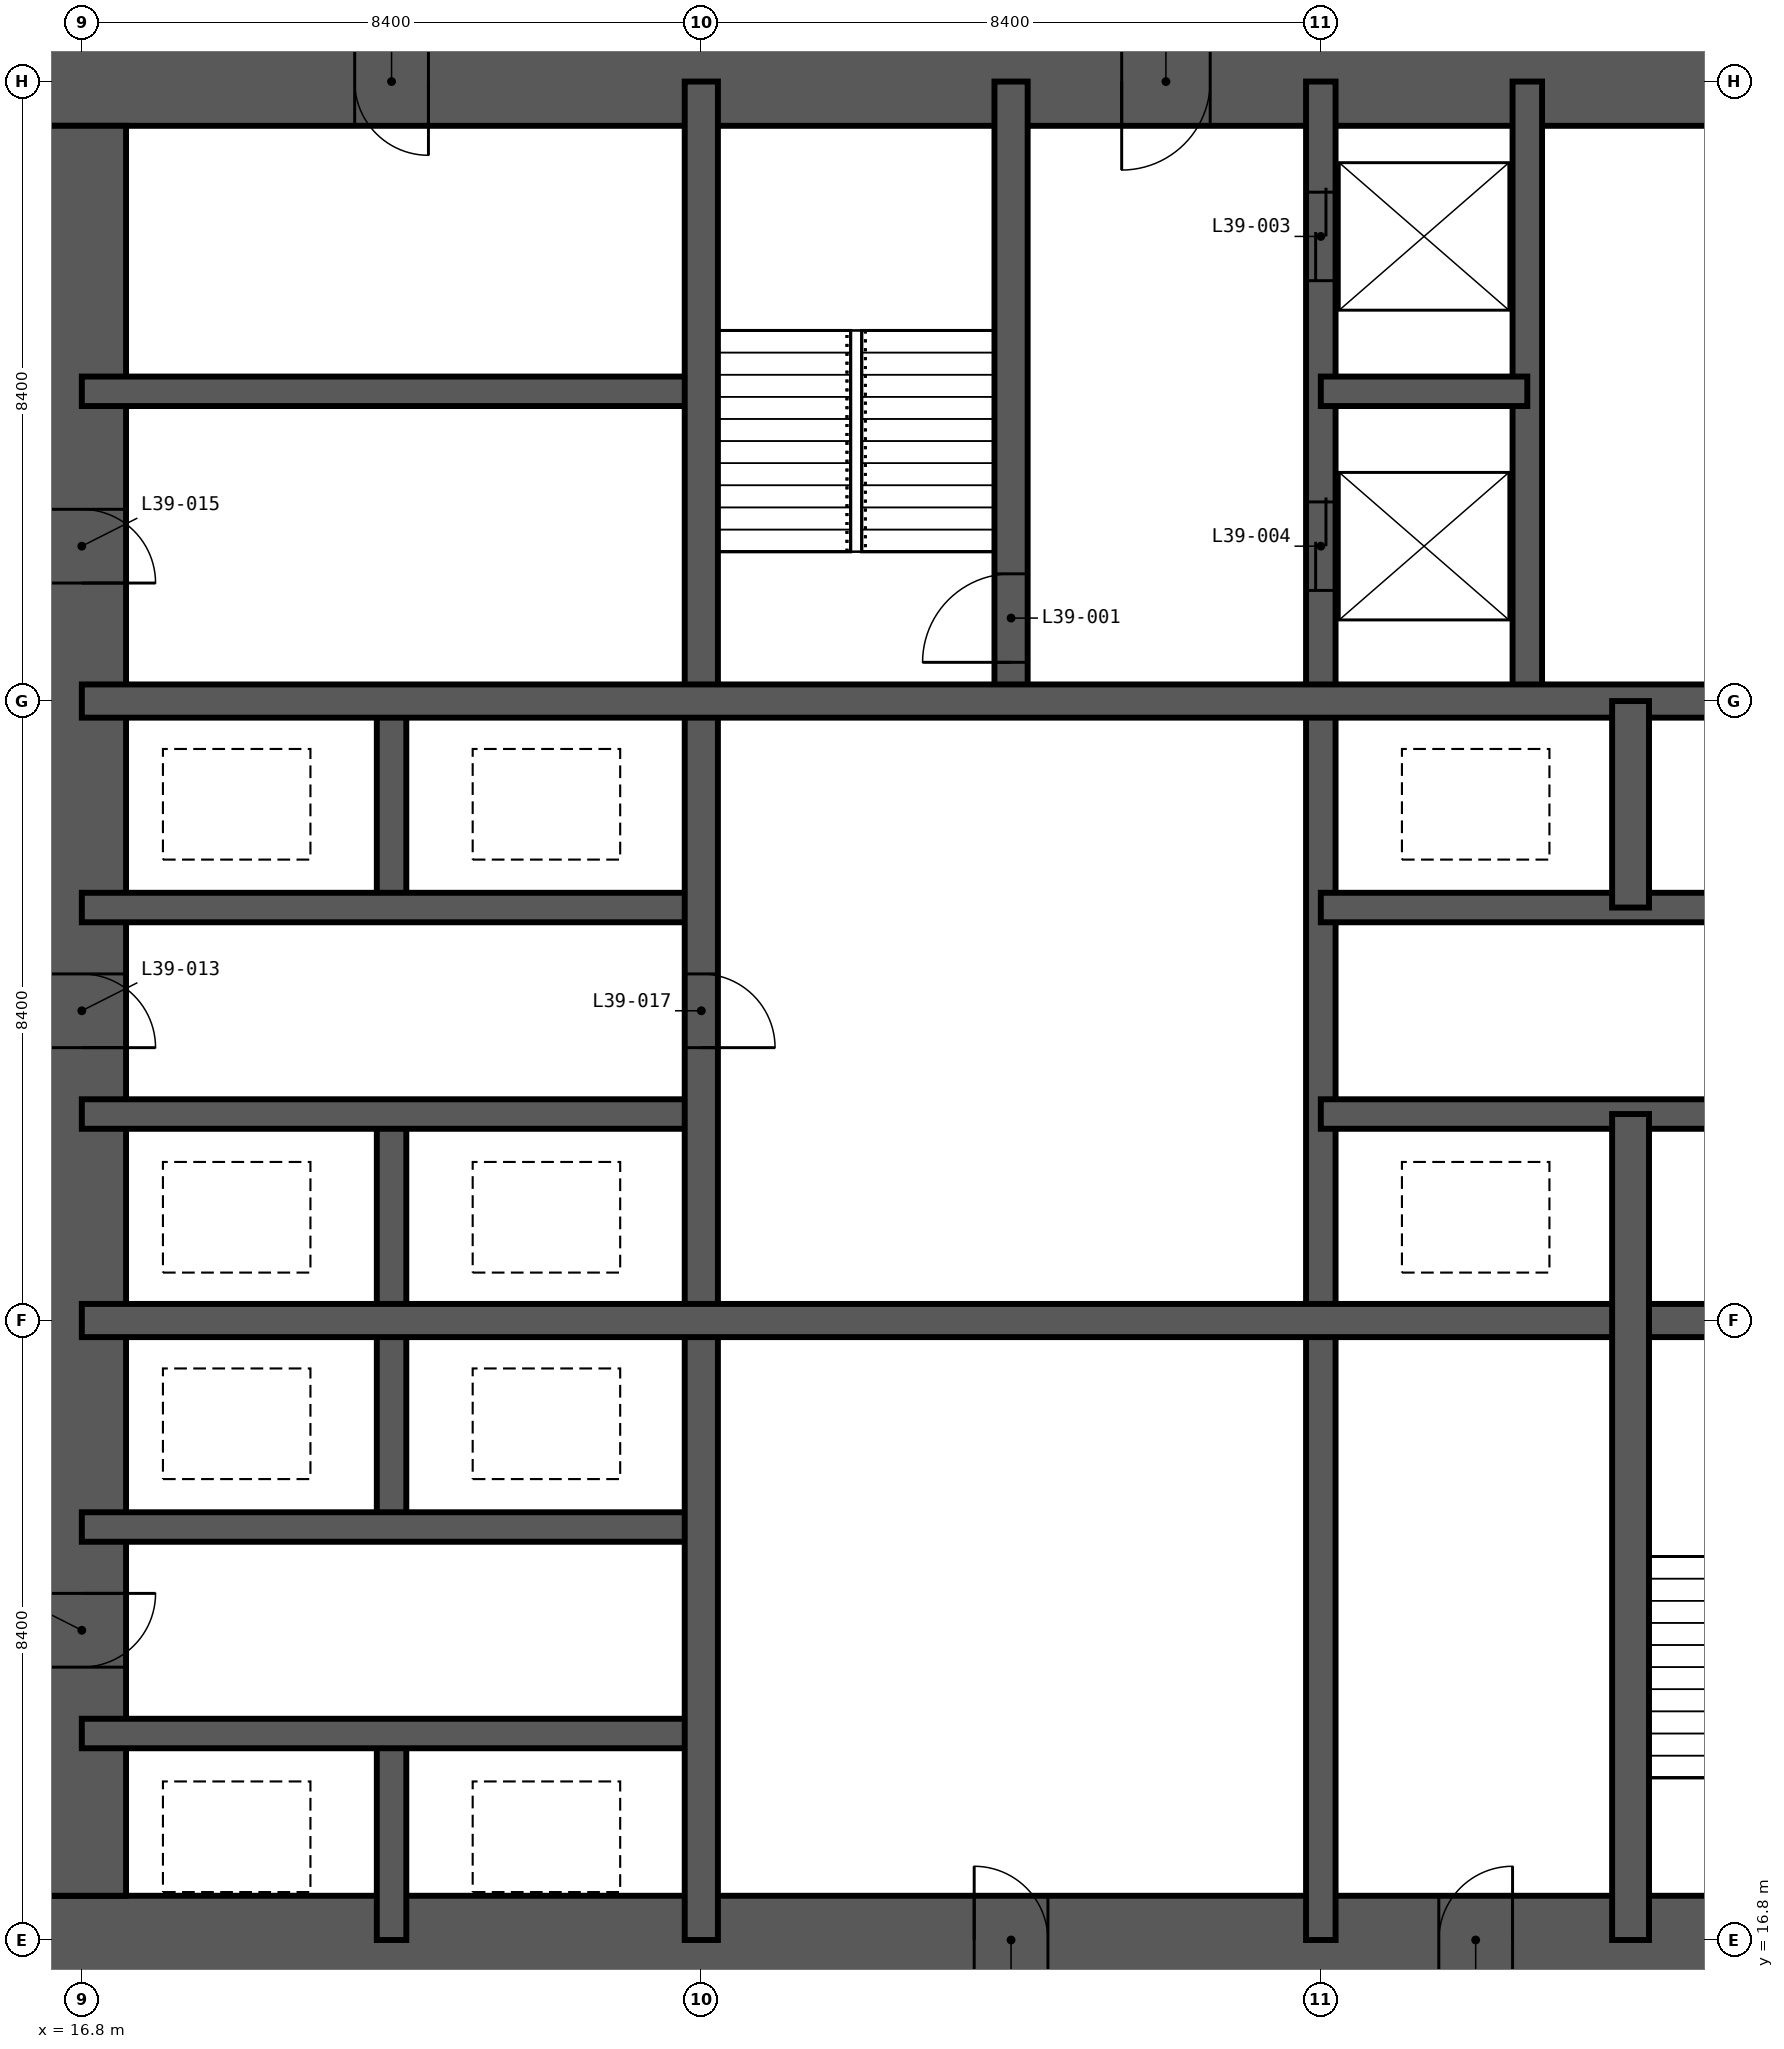
"""IFC4 building model, lengths in metres.
Left out: names, types, materials, properties, quantities, classifications, styles, units other than length and angle.
Written with IfcOpenShell. Run it as: python <this file> out.ifc"""

import sys

from ifc_helpers import new_model, si_unit, direction, frame, frame_2d, origin, place, context, subcontext, project, spatial, rectangle, extrude, element, fill, save


model = new_model("IFC4")
c1 = context("Model", 3, precision=1e-05, world=origin(), true_north=direction((0.0, 1.0)))
c2 = subcontext(c1, "Body", "Model", "MODEL_VIEW")
j1 = project(units=[si_unit("LENGTHUNIT", "METRE"), si_unit("PLANEANGLEUNIT", "RADIAN")], contexts=[c1])
p1 = place(None, origin())
s1 = spatial("IfcSite", under=j1, at=p1, CompositionType="ELEMENT")
p2 = place(p1, origin())
s2 = spatial("IfcBuilding", under=s1, at=p2, CompositionType="ELEMENT")
p3 = place(p2, frame((0.0, 0.0, 153.6)))
s3 = spatial("IfcBuildingStorey", under=s2, at=p3, CompositionType="ELEMENT", Elevation=153.6)
p4 = place(p3, frame((16.2, 16.8, -0.4), z_axis=(0.0, 0.0, 1.0), x_axis=(1.0, 0.0, 0.0)))
e1 = element("IfcWall", 1, at=p4, inside=s3, PredefinedType="SHEAR", context=c2, shape_type="SweptSolid", body=[
    extrude(rectangle(XDim=26.4, YDim=1.2, at=frame_2d((13.2, 0.0))), origin(), (0.0, 0.0, 1.0), 5.45),
])
p5 = place(p4, frame((12.7, 0.0, 0.4)))
e2 = element("IfcOpeningElement", 2, at=p5, cuts=e1, PredefinedType="OPENING", context=c2, shape_type="SweptSolid", body=[
    extrude(rectangle(XDim=1.0, YDim=2.1, at=frame_2d((0.5, 1.05))), frame((0.0, 0.61, 0.0), z_axis=(0.0, -1.0, 0.0), x_axis=(1.0, 0.0, 0.0)), (0.0, 0.0, 1.0), 1.22),
])
p6 = place(p4, frame((19.0, 0.0, 0.4)))
e3 = element("IfcOpeningElement", 3, at=p6, cuts=e1, PredefinedType="OPENING", context=c2, shape_type="SweptSolid", body=[
    extrude(rectangle(XDim=1.0, YDim=2.1, at=frame_2d((0.5, 1.05))), frame((0.0, 0.61, 0.0), z_axis=(0.0, -1.0, 0.0), x_axis=(1.0, 0.0, 0.0)), (0.0, 0.0, 1.0), 1.22),
])
p7 = place(p3, frame((42.6, 42.0, -0.4), z_axis=(0.0, 0.0, 1.0), x_axis=(-1.0, 0.0, 0.0)))
e4 = element("IfcWall", 4, at=p7, inside=s3, PredefinedType="SHEAR", context=c2, shape_type="SweptSolid", body=[
    extrude(rectangle(XDim=26.4, YDim=1.2, at=frame_2d((13.2, 0.0))), origin(), (0.0, 0.0, 1.0), 5.45),
])
p8 = place(p7, frame((21.1, 0.0, 0.4)))
e5 = element("IfcOpeningElement", 5, at=p8, cuts=e4, PredefinedType="OPENING", context=c2, shape_type="SweptSolid", body=[
    extrude(rectangle(XDim=1.0, YDim=2.1, at=frame_2d((0.5, 1.05))), frame((0.0, 0.61, 0.0), z_axis=(0.0, -1.0, 0.0), x_axis=(1.0, 0.0, 0.0)), (0.0, 0.0, 1.0), 1.22),
])
p9 = place(p7, frame((10.5, 0.0, 0.4)))
e6 = element("IfcOpeningElement", 6, at=p9, cuts=e4, PredefinedType="OPENING", context=c2, shape_type="SweptSolid", body=[
    extrude(rectangle(XDim=1.2, YDim=2.2, at=frame_2d((0.6, 1.1))), frame((0.0, 0.61, 0.0), z_axis=(0.0, -1.0, 0.0), x_axis=(1.0, 0.0, 0.0)), (0.0, 0.0, 1.0), 1.22),
])
p10 = place(p3, frame((16.8, 41.4, -0.4), z_axis=(0.0, 0.0, 1.0), x_axis=(0.0, -1.0, 0.0)))
e7 = element("IfcWall", 7, at=p10, inside=s3, PredefinedType="SHEAR", context=c2, shape_type="SweptSolid", body=[
    extrude(rectangle(XDim=24.0, YDim=1.2, at=frame_2d((12.0, 0.0))), origin(), (0.0, 0.0, 1.0), 5.45),
])
p11 = place(p10, frame((11.5, 0.0, 0.4)))
e8 = element("IfcOpeningElement", 8, at=p11, cuts=e7, PredefinedType="OPENING", context=c2, shape_type="SweptSolid", body=[
    extrude(rectangle(XDim=1.0, YDim=2.1, at=frame_2d((0.5, 1.05))), frame((0.0, 0.61, 0.0), z_axis=(0.0, -1.0, 0.0), x_axis=(1.0, 0.0, 0.0)), (0.0, 0.0, 1.0), 1.22),
])
p12 = place(p10, frame((19.9, 0.0, 0.4)))
e9 = element("IfcOpeningElement", 9, at=p12, cuts=e7, PredefinedType="OPENING", context=c2, shape_type="SweptSolid", body=[
    extrude(rectangle(XDim=1.0, YDim=2.1, at=frame_2d((0.5, 1.05))), frame((0.0, 0.61, 0.0), z_axis=(0.0, -1.0, 0.0), x_axis=(1.0, 0.0, 0.0)), (0.0, 0.0, 1.0), 1.22),
])
p13 = place(p10, frame((5.2, 0.0, 0.4)))
e10 = element("IfcOpeningElement", 10, at=p13, cuts=e7, PredefinedType="OPENING", context=c2, shape_type="SweptSolid", body=[
    extrude(rectangle(XDim=1.0, YDim=2.1, at=frame_2d((0.5, 1.05))), frame((0.0, 0.61, 0.0), z_axis=(0.0, -1.0, 0.0), x_axis=(1.0, 0.0, 0.0)), (0.0, 0.0, 1.0), 1.22),
])
p14 = place(p3, frame((21.0, 16.8, -0.4), z_axis=(0.0, 0.0, 1.0), x_axis=(0.0, 1.0, 0.0)))
e11 = element("IfcWall", 11, at=p14, inside=s3, PredefinedType="SHEAR", context=c2, shape_type="SweptSolid", body=[
    extrude(rectangle(XDim=2.8, YDim=0.4, at=frame_2d((1.4, 0.0))), origin(), (0.0, 0.0, 1.0), 5.45),
])
p15 = place(p3, frame((21.0, 22.4, -0.4), z_axis=(0.0, 0.0, 1.0), x_axis=(0.0, 1.0, 0.0)))
e12 = element("IfcWall", 12, at=p15, inside=s3, PredefinedType="SHEAR", context=c2, shape_type="SweptSolid", body=[
    extrude(rectangle(XDim=5.6, YDim=0.4, at=frame_2d((2.8, 0.0))), origin(), (0.0, 0.0, 1.0), 5.45),
])
p16 = place(p3, frame((21.0, 30.8, -0.4), z_axis=(0.0, 0.0, 1.0), x_axis=(0.0, 1.0, 0.0)))
e13 = element("IfcWall", 13, at=p16, inside=s3, PredefinedType="SHEAR", context=c2, shape_type="SweptSolid", body=[
    extrude(rectangle(XDim=2.8, YDim=0.4, at=frame_2d((1.4, 0.0))), origin(), (0.0, 0.0, 1.0), 5.45),
])
p17 = place(p3, frame((33.6, 16.8, -0.4), z_axis=(0.0, 0.0, 1.0), x_axis=(0.0, 1.0, 0.0)))
e14 = element("IfcWall", 14, at=p17, inside=s3, PredefinedType="SHEAR", context=c2, shape_type="SweptSolid", body=[
    extrude(rectangle(XDim=25.2, YDim=0.4, at=frame_2d((12.6, 0.0))), origin(), (0.0, 0.0, 1.0), 5.45),
])
p18 = place(p17, frame((22.5, 0.0, 0.4)))
e15 = element("IfcOpeningElement", 15, at=p18, cuts=e14, PredefinedType="OPENING", context=c2, shape_type="SweptSolid", body=[
    extrude(rectangle(XDim=1.2, YDim=2.2, at=frame_2d((0.6, 1.1))), frame((0.0, 0.21, 0.0), z_axis=(0.0, -1.0, 0.0), x_axis=(1.0, 0.0, 0.0)), (0.0, 0.0, 1.0), 0.42),
])
p19 = place(p17, frame((18.3, 0.0, 0.4)))
e16 = element("IfcOpeningElement", 16, at=p19, cuts=e14, PredefinedType="OPENING", context=c2, shape_type="SweptSolid", body=[
    extrude(rectangle(XDim=1.2, YDim=2.2, at=frame_2d((0.6, 1.1))), frame((0.0, 0.21, 0.0), z_axis=(0.0, -1.0, 0.0), x_axis=(1.0, 0.0, 0.0)), (0.0, 0.0, 1.0), 0.42),
])
for number, where, z_axis, x_axis in (
    (17, (36.4, 33.6, -0.4), (0.0, 0.0, 1.0), (0.0, 1.0, 0.0)),
    (18, (16.8, 19.6, -0.4), (0.0, 0.0, 1.0), (1.0, 0.0, 0.0)),
    (19, (16.8, 22.4, -0.4), (0.0, 0.0, 1.0), (1.0, 0.0, 0.0)),
    (20, (16.8, 28.0, -0.4), (0.0, 0.0, 1.0), (1.0, 0.0, 0.0)),
    (21, (33.6, 28.0, -0.4), (0.0, 0.0, 1.0), (1.0, 0.0, 0.0)),
    (22, (16.8, 30.8, -0.4), (0.0, 0.0, 1.0), (1.0, 0.0, 0.0)),
    (23, (33.6, 30.8, -0.4), (0.0, 0.0, 1.0), (1.0, 0.0, 0.0)),
    (24, (16.8, 37.8, -0.4), (0.0, 0.0, 1.0), (1.0, 0.0, 0.0)),
):
    element("IfcWall", number, at=place(p3, frame(where, z_axis=z_axis, x_axis=x_axis)), inside=s3, PredefinedType="SHEAR", context=c2, shape_type="SweptSolid", body=[
        extrude(rectangle(XDim=8.4, YDim=0.4, at=frame_2d((4.2, 0.0))), origin(), (0.0, 0.0, 1.0), 5.45),
    ])
p20 = place(p3, frame((33.6, 37.8, -0.4), z_axis=(0.0, 0.0, 1.0), x_axis=(1.0, 0.0, 0.0)))
e25 = element("IfcWall", 25, at=p20, inside=s3, PredefinedType="SHEAR", context=c2, shape_type="SweptSolid", body=[
    extrude(rectangle(XDim=2.8, YDim=0.4, at=frame_2d((1.4, 0.0))), origin(), (0.0, 0.0, 1.0), 5.45),
])
p21 = place(p3, frame((25.2, 16.8, -0.4), z_axis=(0.0, 0.0, 1.0), x_axis=(0.0, 1.0, 0.0)))
e26 = element("IfcWall", 26, at=p21, inside=s3, PredefinedType="SHEAR", context=c2, shape_type="SweptSolid", body=[
    extrude(rectangle(XDim=25.2, YDim=0.45, at=frame_2d((12.6, 0.0))), origin(), (0.0, 0.0, 1.0), 5.45),
])
p22 = place(p21, frame((12.1, 0.0, 0.4)))
e27 = element("IfcOpeningElement", 27, at=p22, cuts=e26, PredefinedType="OPENING", context=c2, shape_type="SweptSolid", body=[
    extrude(rectangle(XDim=1.0, YDim=2.1, at=frame_2d((0.5, 1.05))), frame((0.0, 0.235, 0.0), z_axis=(0.0, -1.0, 0.0), x_axis=(1.0, 0.0, 0.0)), (0.0, 0.0, 1.0), 0.47),
])
p23 = place(p3, frame((29.4, 33.6, -0.4), z_axis=(0.0, 0.0, 1.0), x_axis=(0.0, 1.0, 0.0)))
e28 = element("IfcWall", 28, at=p23, inside=s3, PredefinedType="SHEAR", context=c2, shape_type="SweptSolid", body=[
    extrude(rectangle(XDim=8.4, YDim=0.45, at=frame_2d((4.2, 0.0))), origin(), (0.0, 0.0, 1.0), 5.45),
])
p24 = place(p23, frame((0.525, 0.0, 0.4)))
e29 = element("IfcOpeningElement", 29, at=p24, cuts=e28, PredefinedType="OPENING", context=c2, shape_type="SweptSolid", body=[
    extrude(rectangle(XDim=1.2, YDim=2.2, at=frame_2d((0.6, 1.1))), frame((0.0, 0.235, 0.0), z_axis=(0.0, -1.0, 0.0), x_axis=(1.0, 0.0, 0.0)), (0.0, 0.0, 1.0), 0.47),
])
for number, where, z_axis, x_axis in (
    (30, (16.8, 25.2, -0.4), (0.0, 0.0, 1.0), (1.0, 0.0, 0.0)),
    (31, (16.8, 33.6, -0.4), (0.0, 0.0, 1.0), (1.0, 0.0, 0.0)),
):
    element("IfcWall", number, at=place(p3, frame(where, z_axis=z_axis, x_axis=x_axis)), inside=s3, PredefinedType="SHEAR", context=c2, shape_type="SweptSolid", body=[
        extrude(rectangle(XDim=25.2, YDim=0.45, at=frame_2d((12.6, 0.0))), origin(), (0.0, 0.0, 1.0), 5.45),
    ])
p25 = place(p3, frame((37.8, 16.8, -0.4), z_axis=(0.0, 0.0, 1.0), x_axis=(0.0, 1.0, 0.0)))
e32 = element("IfcWall", 32, at=p25, inside=s3, PredefinedType="SHEAR", context=c2, shape_type="SweptSolid", body=[
    extrude(rectangle(XDim=11.2, YDim=0.5, at=frame_2d((5.6, 0.0))), origin(), (0.0, 0.0, 1.0), 5.45),
])
p26 = place(p3, frame((37.8, 30.8, -0.4), z_axis=(0.0, 0.0, 1.0), x_axis=(0.0, 1.0, 0.0)))
e33 = element("IfcWall", 33, at=p26, inside=s3, PredefinedType="SHEAR", context=c2, shape_type="SweptSolid", body=[
    extrude(rectangle(XDim=2.8, YDim=0.5, at=frame_2d((1.4, 0.0))), origin(), (0.0, 0.0, 1.0), 5.45),
])
p27 = place(p24, origin())
e34 = element("IfcDoor", 34, at=p27, inside=s3, OperationType="SINGLE_SWING_LEFT", PredefinedType="DOOR", context=c2, shape_type="SweptSolid", body=[
    extrude(rectangle(XDim=1.2, YDim=2.2, at=frame_2d((0.6, 1.1))), frame((0.0, 0.025, 0.0), z_axis=(0.0, -1.0, 0.0), x_axis=(1.0, 0.0, 0.0)), (0.0, 0.0, 1.0), 0.05),
])
fill(e29, e34)
p28 = place(p18, origin())
e35 = element("IfcDoor", 35, at=p28, inside=s3, OperationType="DOUBLE_DOOR_SLIDING", PredefinedType="DOOR", context=c2, shape_type="SweptSolid", body=[
    extrude(rectangle(XDim=1.2, YDim=2.2, at=frame_2d((0.6, 1.1))), frame((0.0, 0.025, 0.0), z_axis=(0.0, -1.0, 0.0), x_axis=(1.0, 0.0, 0.0)), (0.0, 0.0, 1.0), 0.05),
])
fill(e15, e35)
p29 = place(p19, origin())
e36 = element("IfcDoor", 36, at=p29, inside=s3, OperationType="DOUBLE_DOOR_SLIDING", PredefinedType="DOOR", context=c2, shape_type="SweptSolid", body=[
    extrude(rectangle(XDim=1.2, YDim=2.2, at=frame_2d((0.6, 1.1))), frame((0.0, 0.025, 0.0), z_axis=(0.0, -1.0, 0.0), x_axis=(1.0, 0.0, 0.0)), (0.0, 0.0, 1.0), 0.05),
])
fill(e16, e36)
p30 = place(p11, origin())
e37 = element("IfcDoor", 37, at=p30, inside=s3, OperationType="SINGLE_SWING_RIGHT", PredefinedType="DOOR", context=c2, shape_type="SweptSolid", body=[
    extrude(rectangle(XDim=1.0, YDim=2.1, at=frame_2d((0.5, 1.05))), frame((0.0, 0.025, 0.0), z_axis=(0.0, -1.0, 0.0), x_axis=(1.0, 0.0, 0.0)), (0.0, 0.0, 1.0), 0.05),
])
fill(e8, e37)
p31 = place(p12, origin())
e38 = element("IfcDoor", 38, at=p31, inside=s3, OperationType="SINGLE_SWING_LEFT", PredefinedType="DOOR", context=c2, shape_type="SweptSolid", body=[
    extrude(rectangle(XDim=1.0, YDim=2.1, at=frame_2d((0.5, 1.05))), frame((0.0, 0.025, 0.0), z_axis=(0.0, -1.0, 0.0), x_axis=(1.0, 0.0, 0.0)), (0.0, 0.0, 1.0), 0.05),
])
fill(e9, e38)
p32 = place(p13, origin())
e39 = element("IfcDoor", 39, at=p32, inside=s3, OperationType="SINGLE_SWING_RIGHT", PredefinedType="DOOR", context=c2, shape_type="SweptSolid", body=[
    extrude(rectangle(XDim=1.0, YDim=2.1, at=frame_2d((0.5, 1.05))), frame((0.0, 0.025, 0.0), z_axis=(0.0, -1.0, 0.0), x_axis=(1.0, 0.0, 0.0)), (0.0, 0.0, 1.0), 0.05),
])
fill(e10, e39)
p33 = place(p8, origin())
e40 = element("IfcDoor", 40, at=p33, inside=s3, OperationType="SINGLE_SWING_LEFT", PredefinedType="DOOR", context=c2, shape_type="SweptSolid", body=[
    extrude(rectangle(XDim=1.0, YDim=2.1, at=frame_2d((0.5, 1.05))), frame((0.0, 0.025, 0.0), z_axis=(0.0, -1.0, 0.0), x_axis=(1.0, 0.0, 0.0)), (0.0, 0.0, 1.0), 0.05),
])
fill(e5, e40)
p34 = place(p22, frame((1.0, 0.0, 0.0), z_axis=(0.0, 0.0, 1.0), x_axis=(-1.0, 0.0, 0.0)))
e41 = element("IfcDoor", 41, at=p34, inside=s3, OperationType="SINGLE_SWING_RIGHT", PredefinedType="DOOR", context=c2, shape_type="SweptSolid", body=[
    extrude(rectangle(XDim=1.0, YDim=2.1, at=frame_2d((0.5, 1.05))), frame((0.0, 0.025, 0.0), z_axis=(0.0, -1.0, 0.0), x_axis=(1.0, 0.0, 0.0)), (0.0, 0.0, 1.0), 0.05),
])
fill(e27, e41)
p35 = place(p9, origin())
e42 = element("IfcDoor", 42, at=p35, inside=s3, OperationType="SINGLE_SWING_RIGHT", PredefinedType="DOOR", context=c2, shape_type="SweptSolid", body=[
    extrude(rectangle(XDim=1.2, YDim=2.2, at=frame_2d((0.6, 1.1))), frame((0.0, 0.025, 0.0), z_axis=(0.0, -1.0, 0.0), x_axis=(1.0, 0.0, 0.0)), (0.0, 0.0, 1.0), 0.05),
])
fill(e6, e42)
p36 = place(p5, origin())
e43 = element("IfcDoor", 43, at=p36, inside=s3, OperationType="SINGLE_SWING_LEFT", PredefinedType="DOOR", context=c2, shape_type="SweptSolid", body=[
    extrude(rectangle(XDim=1.0, YDim=2.1, at=frame_2d((0.5, 1.05))), frame((0.0, 0.025, 0.0), z_axis=(0.0, -1.0, 0.0), x_axis=(1.0, 0.0, 0.0)), (0.0, 0.0, 1.0), 0.05),
])
fill(e2, e43)
p37 = place(p6, origin())
e44 = element("IfcDoor", 44, at=p37, inside=s3, OperationType="SINGLE_SWING_RIGHT", PredefinedType="DOOR", context=c2, shape_type="SweptSolid", body=[
    extrude(rectangle(XDim=1.0, YDim=2.1, at=frame_2d((0.5, 1.05))), frame((0.0, 0.025, 0.0), z_axis=(0.0, -1.0, 0.0), x_axis=(1.0, 0.0, 0.0)), (0.0, 0.0, 1.0), 0.05),
])
fill(e3, e44)
save(model, sys.argv[1])
